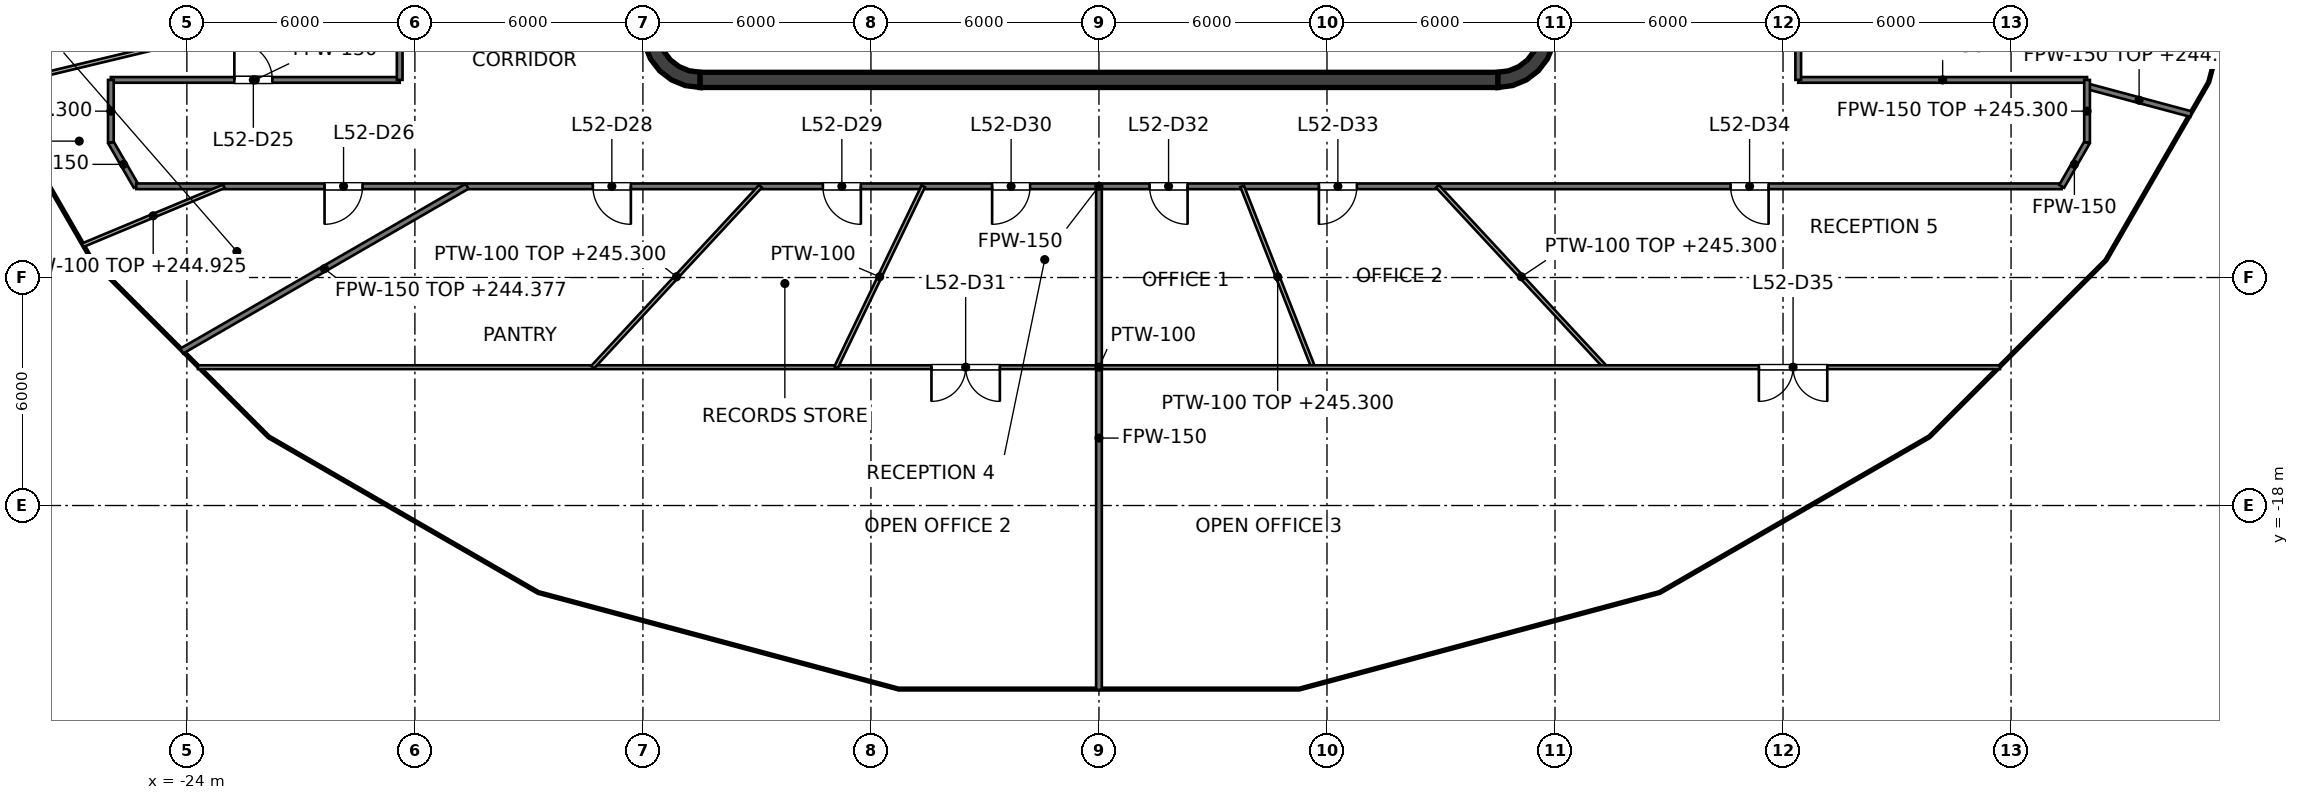
"""IFC4 building model, lengths in metres.
Left out: names, types, materials, properties, quantities, classifications, styles, units other than length and angle.
Written with IfcOpenShell. Run it as: python <this file> out.ifc"""

import sys

from ifc_helpers import new_model, si_unit, direction, frame, frame_2d, origin, place, context, subcontext, project, spatial, polyline, rectangle, outline, extrude, element, fill, save


model = new_model("IFC4")
c1 = context("Model", 3, precision=1e-05, world=origin(), true_north=direction((0.0, 1.0)))
c2 = subcontext(c1, "Body", "Model", "MODEL_VIEW")
j1 = project(units=[si_unit("LENGTHUNIT", "METRE"), si_unit("PLANEANGLEUNIT", "RADIAN")], contexts=[c1])
p1 = place(None, origin())
s1 = spatial("IfcSite", under=j1, at=p1, CompositionType="ELEMENT")
p2 = place(p1, origin())
s2 = spatial("IfcBuilding", under=s1, at=p2, CompositionType="ELEMENT")
p3 = place(p2, frame((0.0, 0.0, 241.6)))
s3 = spatial("IfcBuildingStorey", under=s2, at=p3, CompositionType="ELEMENT", Elevation=241.6)
p4 = place(p3, frame((-10.5, -6.8, 0.0), z_axis=(0.0, 0.0, 1.0), x_axis=(1.0, 0.0, 0.0)))
e1 = element("IfcWall", 1, at=p4, inside=s3, PredefinedType="SHEAR", context=c2, shape_type="SweptSolid", body=[
    extrude(rectangle(XDim=21.0, YDim=0.4, at=frame_2d((10.5, 0.0))), origin(), (0.0, 0.0, 1.0), 4.0),
])
p5 = place(p3, origin())
e2 = element("IfcWall", 2, at=p5, inside=s3, PredefinedType="SHEAR", context=c2, shape_type="SweptSolid", body=[
    extrude(outline(polyline([(-10.5, -7.0), (-10.5, -6.596), (-10.784, -6.559), (-11.048, -6.45), (-11.275, -6.275), (-11.45, -6.048), (-11.559, -5.784), (-11.596, -5.5), (-12.0, -5.5), (-11.949, -5.888), (-11.799, -6.25), (-11.561, -6.561), (-11.25, -6.799), (-10.888, -6.949), (-10.5, -7.0)])), origin(), (0.0, 0.0, 1.0), 4.0),
])
e3 = element("IfcWall", 3, at=p5, inside=s3, PredefinedType="SHEAR", context=c2, shape_type="SweptSolid", body=[
    extrude(outline(polyline([(12.0, -5.5), (11.596, -5.5), (11.559, -5.784), (11.45, -6.048), (11.275, -6.275), (11.048, -6.45), (10.784, -6.559), (10.5, -6.596), (10.5, -7.0), (10.888, -6.949), (11.25, -6.799), (11.561, -6.561), (11.799, -6.25), (11.949, -5.888), (12.0, -5.5)])), origin(), (0.0, 0.0, 1.0), 4.0),
])
p6 = place(p3, frame((0.3, -6.6, 0.0), z_axis=(0.0, 0.0, 1.0), x_axis=(0.0, 1.0, 0.0)))
e4 = element("IfcWall", 4, at=p6, inside=s3, PredefinedType="PARTITIONING", context=c2, shape_type="SweptSolid", body=[
    extrude(rectangle(XDim=2.5, YDim=0.15, at=frame_2d((1.25, 0.0))), origin(), (0.0, 0.0, 1.0), 3.7),
])
p7 = place(p6, frame((0.8, 0.0, 0.0)))
e5 = element("IfcOpeningElement", 5, at=p7, cuts=e4, PredefinedType="OPENING", context=c2, shape_type="SweptSolid", body=[
    extrude(rectangle(XDim=0.9, YDim=2.1, at=frame_2d((0.45, 1.05))), frame((0.0, 0.075, 0.0), z_axis=(0.0, -1.0, 0.0), x_axis=(1.0, 0.0, 0.0)), (0.0, 0.0, 1.0), 0.15),
])
p8 = place(p3, frame((9.0, -6.6, 0.0), z_axis=(0.0, 0.0, 1.0), x_axis=(0.0, 1.0, 0.0)))
e6 = element("IfcWall", 6, at=p8, inside=s3, PredefinedType="SOLIDWALL", context=c2, shape_type="SweptSolid", body=[
    extrude(rectangle(XDim=2.5, YDim=0.25, at=frame_2d((1.25, 0.0))), origin(), (0.0, 0.0, 1.0), 3.85),
])
p9 = place(p8, frame((0.65, 0.0, 0.0)))
e7 = element("IfcOpeningElement", 7, at=p9, cuts=e6, PredefinedType="OPENING", context=c2, shape_type="SweptSolid", body=[
    extrude(rectangle(XDim=1.2, YDim=2.1, at=frame_2d((0.6, 1.05))), frame((0.0, 0.125, 0.0), z_axis=(0.0, -1.0, 0.0), x_axis=(1.0, 0.0, 0.0)), (0.0, 0.0, 1.0), 0.25),
])
p10 = place(p3, frame((-9.0, -6.6, 0.0), z_axis=(0.0, 0.0, 1.0), x_axis=(0.0, 1.0, 0.0)))
e8 = element("IfcWall", 8, at=p10, inside=s3, PredefinedType="PARTITIONING", context=c2, shape_type="SweptSolid", body=[
    extrude(rectangle(XDim=2.5, YDim=0.25, at=frame_2d((1.25, 0.0))), origin(), (0.0, 0.0, 1.0), 3.7),
])
p11 = place(p10, frame((0.75, 0.0, 0.0)))
e9 = element("IfcOpeningElement", 9, at=p11, cuts=e8, PredefinedType="OPENING", context=c2, shape_type="SweptSolid", body=[
    extrude(rectangle(XDim=1.0, YDim=2.1, at=frame_2d((0.5, 1.05))), frame((0.0, 0.125, 0.0), z_axis=(0.0, -1.0, 0.0), x_axis=(1.0, 0.0, 0.0)), (0.0, 0.0, 1.0), 0.25),
])
p12 = place(p3, frame((3.15, -6.6, 0.0), z_axis=(0.0, 0.0, 1.0), x_axis=(0.0, 1.0, 0.0)))
e10 = element("IfcWall", 10, at=p12, inside=s3, PredefinedType="SOLIDWALL", context=c2, shape_type="SweptSolid", body=[
    extrude(rectangle(XDim=2.5, YDim=0.25, at=frame_2d((1.25, 0.0))), origin(), (0.0, 0.0, 1.0), 3.85),
])
p13 = place(p3, frame((-2.9, -6.6, 0.0), z_axis=(0.0, 0.0, 1.0), x_axis=(0.0, 1.0, 0.0)))
e11 = element("IfcWall", 11, at=p13, inside=s3, PredefinedType="PARTITIONING", context=c2, shape_type="SweptSolid", body=[
    extrude(rectangle(XDim=2.5, YDim=0.25, at=frame_2d((1.25, 0.0))), origin(), (0.0, 0.0, 1.0), 3.7),
])
p14 = place(p13, frame((0.8, 0.0, 0.0)))
e12 = element("IfcOpeningElement", 12, at=p14, cuts=e11, PredefinedType="OPENING", context=c2, shape_type="SweptSolid", body=[
    extrude(rectangle(XDim=0.9, YDim=2.1, at=frame_2d((0.45, 1.05))), frame((0.0, 0.125, 0.0), z_axis=(0.0, -1.0, 0.0), x_axis=(1.0, 0.0, 0.0)), (0.0, 0.0, 1.0), 0.25),
])
p15 = place(p3, frame((-26.0, -8.445, 0.0), z_axis=(0.0, 0.0, 1.0), x_axis=(0.500076310463, -0.865981341435, 0.0)))
e13 = element("IfcWall", 13, at=p15, inside=s3, PredefinedType="PARTITIONING", context=c2, shape_type="SweptSolid", body=[
    extrude(rectangle(XDim=1.334, YDim=0.15, at=frame_2d((0.667, 0.0))), origin(), (0.0, 0.0, 1.0), 2.768),
])
p16 = place(p3, frame((26.0, -6.967, 0.0), z_axis=(0.0, 0.0, 1.0), x_axis=(0.965928451997, -0.258809245628, 0.0)))
e14 = element("IfcWall", 14, at=p16, inside=s3, PredefinedType="PARTITIONING", context=c2, shape_type="SweptSolid", body=[
    extrude(rectangle(XDim=2.836, YDim=0.15, at=frame_2d((1.418, 0.0))), origin(), (0.0, 0.0, 1.0), 3.325),
])
p17 = place(p3, frame((-25.333, -9.6, 0.0), z_axis=(0.0, 0.0, 1.0), x_axis=(1.0, 0.0, 0.0)))
e15 = element("IfcWall", 15, at=p17, inside=s3, PredefinedType="PARTITIONING", context=c2, shape_type="SweptSolid", body=[
    extrude(rectangle(XDim=50.666, YDim=0.15, at=frame_2d((25.333, 0.0))), origin(), (0.0, 0.0, 1.0), 2.768),
])
p18 = place(p17, frame((4.956, 0.0, 0.0)))
e16 = element("IfcOpeningElement", 16, at=p18, cuts=e15, PredefinedType="OPENING", context=c2, shape_type="SweptSolid", body=[
    extrude(rectangle(XDim=1.0, YDim=2.1, at=frame_2d((0.5, 1.05))), frame((0.0, 0.075, 0.0), z_axis=(0.0, -1.0, 0.0), x_axis=(1.0, 0.0, 0.0)), (0.0, 0.0, 1.0), 0.15),
])
p19 = place(p17, frame((12.016, 0.0, 0.0)))
e17 = element("IfcOpeningElement", 17, at=p19, cuts=e15, PredefinedType="OPENING", context=c2, shape_type="SweptSolid", body=[
    extrude(rectangle(XDim=1.0, YDim=2.1, at=frame_2d((0.5, 1.05))), frame((0.0, 0.075, 0.0), z_axis=(0.0, -1.0, 0.0), x_axis=(1.0, 0.0, 0.0)), (0.0, 0.0, 1.0), 0.15),
])
p20 = place(p17, frame((18.068, 0.0, 0.0)))
e18 = element("IfcOpeningElement", 18, at=p20, cuts=e15, PredefinedType="OPENING", context=c2, shape_type="SweptSolid", body=[
    extrude(rectangle(XDim=1.0, YDim=2.1, at=frame_2d((0.5, 1.05))), frame((0.0, 0.075, 0.0), z_axis=(0.0, -1.0, 0.0), x_axis=(1.0, 0.0, 0.0)), (0.0, 0.0, 1.0), 0.15),
])
p21 = place(p17, frame((22.521, 0.0, 0.0)))
e19 = element("IfcOpeningElement", 19, at=p21, cuts=e15, PredefinedType="OPENING", context=c2, shape_type="SweptSolid", body=[
    extrude(rectangle(XDim=1.0, YDim=2.1, at=frame_2d((0.5, 1.05))), frame((0.0, 0.075, 0.0), z_axis=(0.0, -1.0, 0.0), x_axis=(1.0, 0.0, 0.0)), (0.0, 0.0, 1.0), 0.15),
])
p22 = place(p17, frame((26.665, 0.0, 0.0)))
e20 = element("IfcOpeningElement", 20, at=p22, cuts=e15, PredefinedType="OPENING", context=c2, shape_type="SweptSolid", body=[
    extrude(rectangle(XDim=1.0, YDim=2.1, at=frame_2d((0.5, 1.05))), frame((0.0, 0.075, 0.0), z_axis=(0.0, -1.0, 0.0), x_axis=(1.0, 0.0, 0.0)), (0.0, 0.0, 1.0), 0.15),
])
p23 = place(p17, frame((31.12, 0.0, 0.0)))
e21 = element("IfcOpeningElement", 21, at=p23, cuts=e15, PredefinedType="OPENING", context=c2, shape_type="SweptSolid", body=[
    extrude(rectangle(XDim=1.0, YDim=2.1, at=frame_2d((0.5, 1.05))), frame((0.0, 0.075, 0.0), z_axis=(0.0, -1.0, 0.0), x_axis=(1.0, 0.0, 0.0)), (0.0, 0.0, 1.0), 0.15),
])
p24 = place(p17, frame((41.953, 0.0, 0.0)))
e22 = element("IfcOpeningElement", 22, at=p24, cuts=e15, PredefinedType="OPENING", context=c2, shape_type="SweptSolid", body=[
    extrude(rectangle(XDim=1.0, YDim=2.1, at=frame_2d((0.5, 1.05))), frame((0.0, 0.075, 0.0), z_axis=(0.0, -1.0, 0.0), x_axis=(1.0, 0.0, 0.0)), (0.0, 0.0, 1.0), 0.15),
])
p25 = place(p3, frame((-26.0, -6.8, 0.0), z_axis=(0.0, 0.0, 1.0), x_axis=(1.0, 0.0, 0.0)))
e23 = element("IfcWall", 23, at=p25, inside=s3, PredefinedType="PARTITIONING", context=c2, shape_type="SweptSolid", body=[
    extrude(rectangle(XDim=7.6, YDim=0.15, at=frame_2d((3.8, 0.0))), origin(), (0.0, 0.0, 1.0), 2.768),
])
p26 = place(p25, frame((3.249, 0.0, 0.0)))
e24 = element("IfcOpeningElement", 24, at=p26, cuts=e23, PredefinedType="OPENING", context=c2, shape_type="SweptSolid", body=[
    extrude(rectangle(XDim=1.0, YDim=2.1, at=frame_2d((0.5, 1.05))), frame((0.0, 0.075, 0.0), z_axis=(0.0, -1.0, 0.0), x_axis=(1.0, 0.0, 0.0)), (0.0, 0.0, 1.0), 0.15),
])
p27 = place(p3, frame((18.4, -6.8, 0.0), z_axis=(0.0, 0.0, 1.0), x_axis=(1.0, 0.0, 0.0)))
e25 = element("IfcWall", 25, at=p27, inside=s3, PredefinedType="PARTITIONING", context=c2, shape_type="SweptSolid", body=[
    extrude(rectangle(XDim=7.6, YDim=0.15, at=frame_2d((3.8, 0.0))), origin(), (0.0, 0.0, 1.0), 2.768),
])
p28 = place(p3, frame((-24.135, -13.935, 0.0), z_axis=(0.0, 0.0, 1.0), x_axis=(0.866016292776, 0.500015780397, 0.0)))
e26 = element("IfcWall", 26, at=p28, inside=s3, PredefinedType="PARTITIONING", context=c2, shape_type="SweptSolid", body=[
    extrude(rectangle(XDim=8.67, YDim=0.15, at=frame_2d((4.335, 0.0))), origin(), (0.0, 0.0, 1.0), 2.777),
])
p29 = place(p3, frame((25.333, -9.6, 0.0), z_axis=(0.0, 0.0, 1.0), x_axis=(0.500076310463, 0.865981341435, 0.0)))
e27 = element("IfcWall", 27, at=p29, inside=s3, PredefinedType="PARTITIONING", context=c2, shape_type="SweptSolid", body=[
    extrude(rectangle(XDim=1.334, YDim=0.15, at=frame_2d((0.667, 0.0))), origin(), (0.0, 0.0, 1.0), 2.768),
])
p30 = place(p3, frame((26.0, -8.445, 0.0), z_axis=(0.0, 0.0, 1.0), x_axis=(0.0, 1.0, 0.0)))
e28 = element("IfcWall", 28, at=p30, inside=s3, PredefinedType="PARTITIONING", context=c2, shape_type="SweptSolid", body=[
    extrude(rectangle(XDim=1.645, YDim=0.15, at=frame_2d((0.823, 0.0))), origin(), (0.0, 0.0, 1.0), 3.7),
])
p31 = place(p3, frame((18.4, -6.8, 0.0), z_axis=(0.0, 0.0, 1.0), x_axis=(0.0, 1.0, 0.0)))
e29 = element("IfcWall", 29, at=p31, inside=s3, PredefinedType="PARTITIONING", context=c2, shape_type="SweptSolid", body=[
    extrude(rectangle(XDim=13.6, YDim=0.15, at=frame_2d((6.8, 0.0))), origin(), (0.0, 0.0, 1.0), 2.768),
])
p32 = place(p31, frame((6.2, 0.0, 0.0)))
e30 = element("IfcOpeningElement", 30, at=p32, cuts=e29, PredefinedType="OPENING", context=c2, shape_type="SweptSolid", body=[
    extrude(rectangle(XDim=1.2, YDim=2.1, at=frame_2d((0.6, 1.05))), frame((0.0, 0.075, 0.0), z_axis=(0.0, -1.0, 0.0), x_axis=(1.0, 0.0, 0.0)), (0.0, 0.0, 1.0), 0.15),
])
p33 = place(p3, frame((0.0, -22.85, 0.0), z_axis=(0.0, 0.0, 1.0), x_axis=(0.0, 1.0, 0.0)))
e31 = element("IfcWall", 31, at=p33, inside=s3, PredefinedType="PARTITIONING", context=c2, shape_type="SweptSolid", body=[
    extrude(rectangle(XDim=13.25, YDim=0.15, at=frame_2d((6.625, 0.0))), origin(), (0.0, 0.0, 1.0), 2.768),
])
p34 = place(p3, frame((-18.4, -6.8, 0.0), z_axis=(0.0, 0.0, 1.0), x_axis=(0.0, 1.0, 0.0)))
e32 = element("IfcWall", 32, at=p34, inside=s3, PredefinedType="PARTITIONING", context=c2, shape_type="SweptSolid", body=[
    extrude(rectangle(XDim=13.6, YDim=0.15, at=frame_2d((6.8, 0.0))), origin(), (0.0, 0.0, 1.0), 2.768),
])
p35 = place(p3, frame((-26.0, -8.445, 0.0), z_axis=(0.0, 0.0, 1.0), x_axis=(0.0, 1.0, 0.0)))
e33 = element("IfcWall", 33, at=p35, inside=s3, PredefinedType="PARTITIONING", context=c2, shape_type="SweptSolid", body=[
    extrude(rectangle(XDim=1.645, YDim=0.15, at=frame_2d((0.823, 0.0))), origin(), (0.0, 0.0, 1.0), 3.7),
])
p36 = place(p3, frame((3.768, -9.6, 0.0), z_axis=(0.0, 0.0, 1.0), x_axis=(0.365299294679, -0.93089012526, 0.0)))
e34 = element("IfcWall", 34, at=p36, inside=s3, PredefinedType="PARTITIONING", context=c2, shape_type="SweptSolid", body=[
    extrude(rectangle(XDim=5.113, YDim=0.1, at=frame_2d((2.557, 0.0))), origin(), (0.0, 0.0, 1.0), 3.7),
])
p37 = place(p3, frame((8.907, -9.6, 0.0), z_axis=(0.0, 0.0, 1.0), x_axis=(0.680201581888, -0.733025107344, 0.0)))
e35 = element("IfcWall", 35, at=p37, inside=s3, PredefinedType="PARTITIONING", context=c2, shape_type="SweptSolid", body=[
    extrude(rectangle(XDim=6.494, YDim=0.1, at=frame_2d((3.247, 0.0))), origin(), (0.0, 0.0, 1.0), 3.7),
])
p38 = place(p3, frame((-23.71, -14.36, 0.0), z_axis=(0.0, 0.0, 1.0), x_axis=(1.0, 0.0, 0.0)))
e36 = element("IfcWall", 36, at=p38, inside=s3, PredefinedType="PARTITIONING", context=c2, shape_type="SweptSolid", body=[
    extrude(rectangle(XDim=47.42, YDim=0.1, at=frame_2d((23.71, 0.0))), origin(), (0.0, 0.0, 1.0), 2.768),
])
p39 = place(p38, frame((19.302, 0.0, 0.0)))
e37 = element("IfcOpeningElement", 37, at=p39, cuts=e36, PredefinedType="OPENING", context=c2, shape_type="SweptSolid", body=[
    extrude(rectangle(XDim=1.8, YDim=2.1, at=frame_2d((0.9, 1.05))), frame((0.0, 0.05, 0.0), z_axis=(0.0, -1.0, 0.0), x_axis=(1.0, 0.0, 0.0)), (0.0, 0.0, 1.0), 0.1),
])
p40 = place(p38, frame((41.074, 0.0, 0.0)))
e38 = element("IfcOpeningElement", 38, at=p40, cuts=e36, PredefinedType="OPENING", context=c2, shape_type="SweptSolid", body=[
    extrude(rectangle(XDim=1.8, YDim=2.1, at=frame_2d((0.9, 1.05))), frame((0.0, 0.05, 0.0), z_axis=(0.0, -1.0, 0.0), x_axis=(1.0, 0.0, 0.0)), (0.0, 0.0, 1.0), 0.1),
])
p41 = place(p3, frame((-29.149, -6.991, 0.0), z_axis=(0.0, 0.0, 1.0), x_axis=(0.97242598182, 0.233211727583, 0.0)))
e39 = element("IfcWall", 39, at=p41, inside=s3, PredefinedType="PARTITIONING", context=c2, shape_type="SweptSolid", body=[
    extrude(rectangle(XDim=11.054, YDim=0.1, at=frame_2d((5.527, 0.0))), origin(), (0.0, 0.0, 1.0), 2.768),
])
p42 = place(p3, frame((-26.747, -11.152, 0.0), z_axis=(0.0, 0.0, 1.0), x_axis=(0.922980174508, 0.384847498973, 0.0)))
e40 = element("IfcWall", 40, at=p42, inside=s3, PredefinedType="PARTITIONING", context=c2, shape_type="SweptSolid", body=[
    extrude(rectangle(XDim=4.033, YDim=0.1, at=frame_2d((2.016, 0.0))), origin(), (0.0, 0.0, 1.0), 3.325),
])
p43 = place(p3, frame((-13.324, -14.36, 0.0), z_axis=(0.0, 0.0, 1.0), x_axis=(0.680201581888, 0.733025107344, 0.0)))
e41 = element("IfcWall", 41, at=p43, inside=s3, PredefinedType="PARTITIONING", context=c2, shape_type="SweptSolid", body=[
    extrude(rectangle(XDim=6.494, YDim=0.1, at=frame_2d((3.247, 0.0))), origin(), (0.0, 0.0, 1.0), 3.7),
])
p44 = place(p3, frame((-6.915, -14.36, 0.0), z_axis=(0.0, 0.0, 1.0), x_axis=(0.433836460285, 0.90099163466, 0.0)))
e42 = element("IfcWall", 42, at=p44, inside=s3, PredefinedType="PARTITIONING", context=c2, shape_type="SweptSolid", body=[
    extrude(rectangle(XDim=5.283, YDim=0.1, at=frame_2d((2.642, 0.0))), origin(), (0.0, 0.0, 1.0), 2.768),
])
p45 = place(p26, origin())
e43 = element("IfcDoor", 43, at=p45, inside=s3, OperationType="SINGLE_SWING_LEFT", PredefinedType="DOOR", context=c2, shape_type="SweptSolid", body=[
    extrude(rectangle(XDim=1.0, YDim=2.1, at=frame_2d((0.5, 1.05))), frame((0.0, 0.025, 0.0), z_axis=(0.0, -1.0, 0.0), x_axis=(1.0, 0.0, 0.0)), (0.0, 0.0, 1.0), 0.05),
])
fill(e24, e43)
p46 = place(p18, origin())
e44 = element("IfcDoor", 44, at=p46, inside=s3, OperationType="SINGLE_SWING_LEFT", PredefinedType="DOOR", context=c2, shape_type="SweptSolid", body=[
    extrude(rectangle(XDim=1.0, YDim=2.1, at=frame_2d((0.5, 1.05))), frame((0.0, 0.025, 0.0), z_axis=(0.0, -1.0, 0.0), x_axis=(1.0, 0.0, 0.0)), (0.0, 0.0, 1.0), 0.05),
])
fill(e16, e44)
p47 = place(p19, origin())
e45 = element("IfcDoor", 45, at=p47, inside=s3, OperationType="SINGLE_SWING_RIGHT", PredefinedType="DOOR", context=c2, shape_type="SweptSolid", body=[
    extrude(rectangle(XDim=1.0, YDim=2.1, at=frame_2d((0.5, 1.05))), frame((0.0, 0.025, 0.0), z_axis=(0.0, -1.0, 0.0), x_axis=(1.0, 0.0, 0.0)), (0.0, 0.0, 1.0), 0.05),
])
fill(e17, e45)
p48 = place(p20, origin())
e46 = element("IfcDoor", 46, at=p48, inside=s3, OperationType="SINGLE_SWING_RIGHT", PredefinedType="DOOR", context=c2, shape_type="SweptSolid", body=[
    extrude(rectangle(XDim=1.0, YDim=2.1, at=frame_2d((0.5, 1.05))), frame((0.0, 0.025, 0.0), z_axis=(0.0, -1.0, 0.0), x_axis=(1.0, 0.0, 0.0)), (0.0, 0.0, 1.0), 0.05),
])
fill(e18, e46)
p49 = place(p21, origin())
e47 = element("IfcDoor", 47, at=p49, inside=s3, OperationType="SINGLE_SWING_LEFT", PredefinedType="DOOR", context=c2, shape_type="SweptSolid", body=[
    extrude(rectangle(XDim=1.0, YDim=2.1, at=frame_2d((0.5, 1.05))), frame((0.0, 0.025, 0.0), z_axis=(0.0, -1.0, 0.0), x_axis=(1.0, 0.0, 0.0)), (0.0, 0.0, 1.0), 0.05),
])
fill(e19, e47)
p50 = place(p39, origin())
e48 = element("IfcDoor", 48, at=p50, inside=s3, OperationType="DOUBLE_DOOR_SINGLE_SWING", PredefinedType="DOOR", context=c2, shape_type="SweptSolid", body=[
    extrude(rectangle(XDim=1.8, YDim=2.1, at=frame_2d((0.9, 1.05))), frame((0.0, 0.025, 0.0), z_axis=(0.0, -1.0, 0.0), x_axis=(1.0, 0.0, 0.0)), (0.0, 0.0, 1.0), 0.05),
])
fill(e37, e48)
p51 = place(p22, origin())
e49 = element("IfcDoor", 49, at=p51, inside=s3, OperationType="SINGLE_SWING_RIGHT", PredefinedType="DOOR", context=c2, shape_type="SweptSolid", body=[
    extrude(rectangle(XDim=1.0, YDim=2.1, at=frame_2d((0.5, 1.05))), frame((0.0, 0.025, 0.0), z_axis=(0.0, -1.0, 0.0), x_axis=(1.0, 0.0, 0.0)), (0.0, 0.0, 1.0), 0.05),
])
fill(e20, e49)
p52 = place(p23, origin())
e50 = element("IfcDoor", 50, at=p52, inside=s3, OperationType="SINGLE_SWING_LEFT", PredefinedType="DOOR", context=c2, shape_type="SweptSolid", body=[
    extrude(rectangle(XDim=1.0, YDim=2.1, at=frame_2d((0.5, 1.05))), frame((0.0, 0.025, 0.0), z_axis=(0.0, -1.0, 0.0), x_axis=(1.0, 0.0, 0.0)), (0.0, 0.0, 1.0), 0.05),
])
fill(e21, e50)
p53 = place(p24, origin())
e51 = element("IfcDoor", 51, at=p53, inside=s3, OperationType="SINGLE_SWING_RIGHT", PredefinedType="DOOR", context=c2, shape_type="SweptSolid", body=[
    extrude(rectangle(XDim=1.0, YDim=2.1, at=frame_2d((0.5, 1.05))), frame((0.0, 0.025, 0.0), z_axis=(0.0, -1.0, 0.0), x_axis=(1.0, 0.0, 0.0)), (0.0, 0.0, 1.0), 0.05),
])
fill(e22, e51)
p54 = place(p40, origin())
e52 = element("IfcDoor", 52, at=p54, inside=s3, OperationType="DOUBLE_DOOR_SINGLE_SWING", PredefinedType="DOOR", context=c2, shape_type="SweptSolid", body=[
    extrude(rectangle(XDim=1.8, YDim=2.1, at=frame_2d((0.9, 1.05))), frame((0.0, 0.025, 0.0), z_axis=(0.0, -1.0, 0.0), x_axis=(1.0, 0.0, 0.0)), (0.0, 0.0, 1.0), 0.05),
])
fill(e38, e52)
save(model, sys.argv[1])
